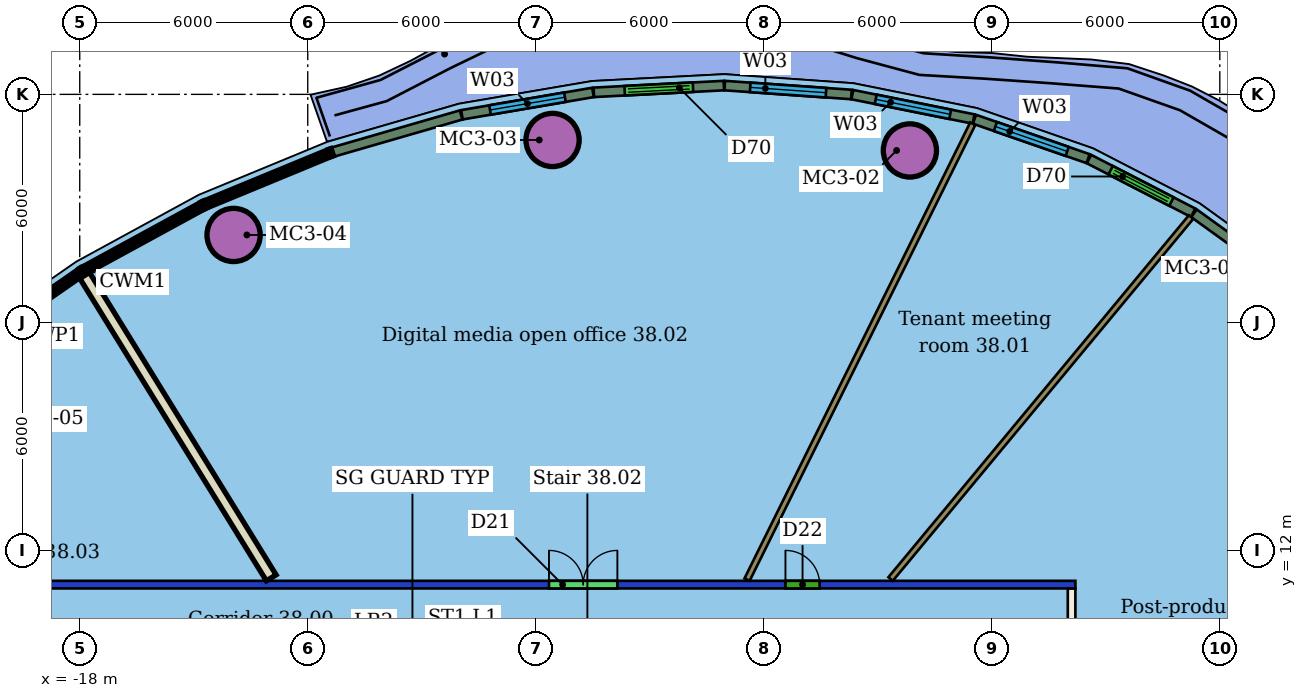
"""IFC4 building model, lengths in metres.
Left out: names, types, materials, properties, quantities, classifications, styles, units other than length and angle.
Written with IfcOpenShell. Run it as: python <this file> out.ifc"""

import sys

from ifc_helpers import new_model, si_unit, direction, frame, frame_2d, origin, origin_2d, place, context, subcontext, project, spatial, rectangle, hollow_circle, extrude, element, fill, save


model = new_model("IFC4")
c1 = context("Model", 3, precision=1e-05, world=origin(), true_north=direction((0.0, 1.0)))
c2 = subcontext(c1, "Body", "Model", "MODEL_VIEW")
j1 = project(units=[si_unit("LENGTHUNIT", "METRE"), si_unit("PLANEANGLEUNIT", "RADIAN")], contexts=[c1])
p1 = place(None, origin())
s1 = spatial("IfcSite", under=j1, at=p1, CompositionType="ELEMENT")
p2 = place(p1, origin())
s2 = spatial("IfcBuilding", under=s1, at=p2, CompositionType="ELEMENT")
p3 = place(p2, frame((0.0, 0.0, 161.4)))
s3 = spatial("IfcBuildingStorey", under=s2, at=p3, CompositionType="ELEMENT", Elevation=161.4)
for number, where, z_axis, x_axis in (
    (1, (3.845, 22.524, 0.0), (0.0, 0.0, 1.0), (1.0, 0.0, 0.0)),
    (2, (-5.558, 22.8, 0.0), (0.0, 0.0, 1.0), (1.0, 0.0, 0.0)),
    (3, (-13.952, 20.301, 0.0), (0.0, 0.0, 1.0), (1.0, 0.0, 0.0)),
):
    element("IfcColumn", number, at=place(p3, frame(where, z_axis=z_axis, x_axis=x_axis)), inside=s3, PredefinedType="COLUMN", context=c2, shape_type="SweptSolid", body=[
        extrude(hollow_circle(Radius=0.7, WallThickness=0.05, at=origin_2d()), origin(), (0.0, 0.0, 1.0), 3.45),
    ])
p4 = place(p3, frame((-20.2, 11.1, 0.0), z_axis=(0.0, 0.0, 1.0), x_axis=(1.0, 0.0, 0.0)))
e4 = element("IfcWall", 4, at=p4, inside=s3, PredefinedType="PARTITIONING", context=c2, shape_type="SweptSolid", body=[
    extrude(rectangle(XDim=28.4, YDim=0.2, at=frame_2d((14.2, 0.0))), origin(), (0.0, 0.0, 1.0), 3.05),
])
p5 = place(p4, frame((20.771, 0.0, 0.0)))
e5 = element("IfcOpeningElement", 5, at=p5, cuts=e4, PredefinedType="OPENING", context=c2, shape_type="SweptSolid", body=[
    extrude(rectangle(XDim=0.9, YDim=2.1, at=frame_2d((0.45, 1.05))), frame((0.0, 0.11, 0.0), z_axis=(0.0, -1.0, 0.0), x_axis=(1.0, 0.0, 0.0)), (0.0, 0.0, 1.0), 0.22),
])
p6 = place(p4, frame((14.548, 0.0, 0.0)))
e6 = element("IfcOpeningElement", 6, at=p6, cuts=e4, PredefinedType="OPENING", context=c2, shape_type="SweptSolid", body=[
    extrude(rectangle(XDim=1.8, YDim=2.1, at=frame_2d((0.9, 1.05))), frame((0.0, 0.11, 0.0), z_axis=(0.0, -1.0, 0.0), x_axis=(1.0, 0.0, 0.0)), (0.0, 0.0, 1.0), 0.22),
])
p7 = place(p3, frame((8.1, 11.0, 0.0), z_axis=(0.0, 0.0, 1.0), x_axis=(0.0, -1.0, 0.0)))
e7 = element("IfcWall", 7, at=p7, inside=s3, PredefinedType="PARTITIONING", context=c2, shape_type="SweptSolid", body=[
    extrude(rectangle(XDim=22.0, YDim=0.2, at=frame_2d((11.0, 0.0))), origin(), (0.0, 0.0, 1.0), 3.45),
])
p8 = place(p7, frame((12.884, 0.0, 0.0)))
e8 = element("IfcOpeningElement", 8, at=p8, cuts=e7, PredefinedType="OPENING", context=c2, shape_type="SweptSolid", body=[
    extrude(rectangle(XDim=1.8, YDim=2.1, at=frame_2d((0.9, 1.05))), frame((0.0, 0.11, 0.0), z_axis=(0.0, -1.0, 0.0), x_axis=(1.0, 0.0, 0.0)), (0.0, 0.0, 1.0), 0.22),
])
p9 = place(p7, frame((5.074, 0.0, 0.0)))
e9 = element("IfcOpeningElement", 9, at=p9, cuts=e7, PredefinedType="OPENING", context=c2, shape_type="SweptSolid", body=[
    extrude(rectangle(XDim=1.8, YDim=2.1, at=frame_2d((0.9, 1.05))), frame((0.0, 0.11, 0.0), z_axis=(0.0, -1.0, 0.0), x_axis=(1.0, 0.0, 0.0)), (0.0, 0.0, 1.0), 0.22),
])
p10 = place(p3, frame((11.244, 20.772, 0.0), z_axis=(0.0, 0.0, 1.0), x_axis=(-0.638730261961, -0.769430732721, 0.0)))
e10 = element("IfcWall", 10, at=p10, inside=s3, PredefinedType="PARTITIONING", context=c2, shape_type="SweptSolid", body=[
    extrude(rectangle(XDim=12.379, YDim=0.15, at=frame_2d((6.189, 0.0))), origin(), (0.0, 0.0, 1.0), 3.45),
])
p11 = place(p3, frame((5.499, 23.229, 0.0), z_axis=(0.0, 0.0, 1.0), x_axis=(-0.443656871775, -0.896196730705, 0.0)))
e11 = element("IfcWall", 11, at=p11, inside=s3, PredefinedType="PARTITIONING", context=c2, shape_type="SweptSolid", body=[
    extrude(rectangle(XDim=13.385, YDim=0.15, at=frame_2d((6.692, 0.0))), origin(), (0.0, 0.0, 1.0), 3.45),
])
p12 = place(p3, frame((-17.871, 19.235, 0.0), z_axis=(0.0, 0.0, 1.0), x_axis=(0.525169292987, -0.850997775381, 0.0)))
e12 = element("IfcWall", 12, at=p12, inside=s3, PredefinedType="PARTITIONING", context=c2, shape_type="SweptSolid", body=[
    extrude(rectangle(XDim=9.35, YDim=0.3, at=frame_2d((4.675, 0.0))), origin(), (0.0, 0.0, 1.0), 3.45),
])
p13 = place(p3, frame((13.732, 19.131, 0.0), z_axis=(0.0, 0.0, 1.0), x_axis=(-0.810861050922, 0.58523871719, 0.0)))
e13 = element("IfcWall", 13, at=p13, inside=s3, PredefinedType="SOLIDWALL", context=c2, shape_type="SweptSolid", body=[
    extrude(rectangle(XDim=2.974, YDim=0.25, at=frame_2d((1.487, 0.0))), origin(), (0.0, 0.0, 1.0), 3.1),
])
p14 = place(p3, frame((11.298, 20.885, 0.0), z_axis=(0.0, 0.0, 1.0), x_axis=(-0.88878300735, 0.458328229378, 0.0)))
e14 = element("IfcWall", 14, at=p14, inside=s3, PredefinedType="SOLIDWALL", context=c2, shape_type="SweptSolid", body=[
    extrude(rectangle(XDim=3.083, YDim=0.25, at=frame_2d((1.542, 0.0))), origin(), (0.0, 0.0, 1.0), 3.1),
])
p15 = place(p14, frame((0.642, 0.0, 0.0)))
e15 = element("IfcOpeningElement", 15, at=p15, cuts=e14, PredefinedType="OPENING", context=c2, shape_type="SweptSolid", body=[
    extrude(rectangle(XDim=1.8, YDim=2.4, at=frame_2d((0.9, 1.2))), frame((0.0, 0.135, 0.0), z_axis=(0.0, -1.0, 0.0), x_axis=(1.0, 0.0, 0.0)), (0.0, 0.0, 1.0), 0.27),
])
p16 = place(p3, frame((8.534, 22.308, 0.0), z_axis=(0.0, 0.0, 1.0), x_axis=(-0.944803405923, 0.32763779415, 0.0)))
e16 = element("IfcWall", 16, at=p16, inside=s3, PredefinedType="SOLIDWALL", context=c2, shape_type="SweptSolid", body=[
    extrude(rectangle(XDim=3.165, YDim=0.25, at=frame_2d((1.582, 0.0))), origin(), (0.0, 0.0, 1.0), 3.1),
])
p17 = place(p16, frame((0.582, 0.0, 0.9)))
e17 = element("IfcOpeningElement", 17, at=p17, cuts=e16, PredefinedType="OPENING", context=c2, shape_type="SweptSolid", body=[
    extrude(rectangle(XDim=2.0, YDim=2.1, at=frame_2d((1.0, 1.05))), frame((0.0, 0.135, 0.0), z_axis=(0.0, -1.0, 0.0), x_axis=(1.0, 0.0, 0.0)), (0.0, 0.0, 1.0), 0.27),
])
p18 = place(p3, frame((5.52, 23.352, 0.0), z_axis=(0.0, 0.0, 1.0), x_axis=(-0.98035778713, 0.19722730342, 0.0)))
e18 = element("IfcWall", 18, at=p18, inside=s3, PredefinedType="SOLIDWALL", context=c2, shape_type="SweptSolid", body=[
    extrude(rectangle(XDim=3.253, YDim=0.25, at=frame_2d((1.626, 0.0))), origin(), (0.0, 0.0, 1.0), 3.1),
])
p19 = place(p18, frame((0.626, 0.0, 0.9)))
e19 = element("IfcOpeningElement", 19, at=p19, cuts=e18, PredefinedType="OPENING", context=c2, shape_type="SweptSolid", body=[
    extrude(rectangle(XDim=2.0, YDim=2.1, at=frame_2d((1.0, 1.05))), frame((0.0, 0.135, 0.0), z_axis=(0.0, -1.0, 0.0), x_axis=(1.0, 0.0, 0.0)), (0.0, 0.0, 1.0), 0.27),
])
p20 = place(p3, frame((2.307, 23.997, 0.0), z_axis=(0.0, 0.0, 1.0), x_axis=(-0.997538162384, 0.070125705616, 0.0)))
e20 = element("IfcWall", 20, at=p20, inside=s3, PredefinedType="SOLIDWALL", context=c2, shape_type="SweptSolid", body=[
    extrude(rectangle(XDim=3.342, YDim=0.25, at=frame_2d((1.671, 0.0))), origin(), (0.0, 0.0, 1.0), 3.1),
])
p21 = place(p20, frame((0.671, 0.0, 0.9)))
e21 = element("IfcOpeningElement", 21, at=p21, cuts=e20, PredefinedType="OPENING", context=c2, shape_type="SweptSolid", body=[
    extrude(rectangle(XDim=2.0, YDim=2.1, at=frame_2d((1.0, 1.05))), frame((0.0, 0.135, 0.0), z_axis=(0.0, -1.0, 0.0), x_axis=(1.0, 0.0, 0.0)), (0.0, 0.0, 1.0), 0.27),
])
p22 = place(p3, frame((-1.05, 24.231, 0.0), z_axis=(0.0, 0.0, 1.0), x_axis=(-0.99864973031, -0.051949168931, 0.0)))
e22 = element("IfcWall", 22, at=p22, inside=s3, PredefinedType="SOLIDWALL", context=c2, shape_type="SweptSolid", body=[
    extrude(rectangle(XDim=3.426, YDim=0.25, at=frame_2d((1.713, 0.0))), origin(), (0.0, 0.0, 1.0), 3.1),
])
p23 = place(p22, frame((0.813, 0.0, 0.0)))
e23 = element("IfcOpeningElement", 23, at=p23, cuts=e22, PredefinedType="OPENING", context=c2, shape_type="SweptSolid", body=[
    extrude(rectangle(XDim=1.8, YDim=2.4, at=frame_2d((0.9, 1.2))), frame((0.0, 0.135, 0.0), z_axis=(0.0, -1.0, 0.0), x_axis=(1.0, 0.0, 0.0)), (0.0, 0.0, 1.0), 0.27),
])
p24 = place(p3, frame((-4.494, 24.051, 0.0), z_axis=(0.0, 0.0, 1.0), x_axis=(-0.985772258291, -0.168086450327, 0.0)))
e24 = element("IfcWall", 24, at=p24, inside=s3, PredefinedType="SOLIDWALL", context=c2, shape_type="SweptSolid", body=[
    extrude(rectangle(XDim=3.499, YDim=0.25, at=frame_2d((1.75, 0.0))), origin(), (0.0, 0.0, 1.0), 3.1),
])
p25 = place(p24, frame((0.75, 0.0, 0.9)))
e25 = element("IfcOpeningElement", 25, at=p25, cuts=e24, PredefinedType="OPENING", context=c2, shape_type="SweptSolid", body=[
    extrude(rectangle(XDim=2.0, YDim=2.1, at=frame_2d((1.0, 1.05))), frame((0.0, 0.135, 0.0), z_axis=(0.0, -1.0, 0.0), x_axis=(1.0, 0.0, 0.0)), (0.0, 0.0, 1.0), 0.27),
])
p26 = place(p3, frame((-7.965, 23.458, 0.0), z_axis=(0.0, 0.0, 1.0), x_axis=(-0.960600884438, -0.277931539801, 0.0)))
e26 = element("IfcWall", 26, at=p26, inside=s3, PredefinedType="SOLIDWALL", context=c2, shape_type="SweptSolid", body=[
    extrude(rectangle(XDim=3.514, YDim=0.25, at=frame_2d((1.757, 0.0))), origin(), (0.0, 0.0, 1.0), 3.1),
])
p27 = place(p5, origin())
e27 = element("IfcDoor", 27, at=p27, inside=s3, OperationType="SINGLE_SWING_LEFT", PredefinedType="DOOR", context=c2, shape_type="SweptSolid", body=[
    extrude(rectangle(XDim=0.9, YDim=2.1, at=frame_2d((0.45, 1.05))), frame((0.0, 0.025, 0.0), z_axis=(0.0, -1.0, 0.0), x_axis=(1.0, 0.0, 0.0)), (0.0, 0.0, 1.0), 0.05),
])
fill(e5, e27)
p28 = place(p6, origin())
e28 = element("IfcDoor", 28, at=p28, inside=s3, OperationType="DOUBLE_DOOR_SINGLE_SWING", PredefinedType="DOOR", context=c2, shape_type="SweptSolid", body=[
    extrude(rectangle(XDim=1.8, YDim=2.1, at=frame_2d((0.9, 1.05))), frame((0.0, 0.025, 0.0), z_axis=(0.0, -1.0, 0.0), x_axis=(1.0, 0.0, 0.0)), (0.0, 0.0, 1.0), 0.05),
])
fill(e6, e28)
p29 = place(p15, origin())
e29 = element("IfcDoor", 29, at=p29, inside=s3, OperationType="DOUBLE_DOOR_SLIDING", PredefinedType="DOOR", context=c2, shape_type="SweptSolid", body=[
    extrude(rectangle(XDim=1.8, YDim=2.4, at=frame_2d((0.9, 1.2))), frame((0.0, 0.025, 0.0), z_axis=(0.0, -1.0, 0.0), x_axis=(1.0, 0.0, 0.0)), (0.0, 0.0, 1.0), 0.05),
])
fill(e15, e29)
p30 = place(p17, origin())
e30 = element("IfcWindow", 30, at=p30, inside=s3, PartitioningType="SINGLE_PANEL", PredefinedType="WINDOW", context=c2, shape_type="SweptSolid", body=[
    extrude(rectangle(XDim=2.0, YDim=2.1, at=frame_2d((1.0, 1.05))), frame((0.0, 0.03, 0.0), z_axis=(0.0, -1.0, 0.0), x_axis=(1.0, 0.0, 0.0)), (0.0, 0.0, 1.0), 0.06),
])
fill(e17, e30)
p31 = place(p19, origin())
e31 = element("IfcWindow", 31, at=p31, inside=s3, PartitioningType="SINGLE_PANEL", PredefinedType="WINDOW", context=c2, shape_type="SweptSolid", body=[
    extrude(rectangle(XDim=2.0, YDim=2.1, at=frame_2d((1.0, 1.05))), frame((0.0, 0.03, 0.0), z_axis=(0.0, -1.0, 0.0), x_axis=(1.0, 0.0, 0.0)), (0.0, 0.0, 1.0), 0.06),
])
fill(e19, e31)
p32 = place(p21, origin())
e32 = element("IfcWindow", 32, at=p32, inside=s3, PartitioningType="SINGLE_PANEL", PredefinedType="WINDOW", context=c2, shape_type="SweptSolid", body=[
    extrude(rectangle(XDim=2.0, YDim=2.1, at=frame_2d((1.0, 1.05))), frame((0.0, 0.03, 0.0), z_axis=(0.0, -1.0, 0.0), x_axis=(1.0, 0.0, 0.0)), (0.0, 0.0, 1.0), 0.06),
])
fill(e21, e32)
p33 = place(p23, origin())
e33 = element("IfcDoor", 33, at=p33, inside=s3, OperationType="DOUBLE_DOOR_SLIDING", PredefinedType="DOOR", context=c2, shape_type="SweptSolid", body=[
    extrude(rectangle(XDim=1.8, YDim=2.4, at=frame_2d((0.9, 1.2))), frame((0.0, 0.025, 0.0), z_axis=(0.0, -1.0, 0.0), x_axis=(1.0, 0.0, 0.0)), (0.0, 0.0, 1.0), 0.05),
])
fill(e23, e33)
p34 = place(p25, origin())
e34 = element("IfcWindow", 34, at=p34, inside=s3, PartitioningType="SINGLE_PANEL", PredefinedType="WINDOW", context=c2, shape_type="SweptSolid", body=[
    extrude(rectangle(XDim=2.0, YDim=2.1, at=frame_2d((1.0, 1.05))), frame((0.0, 0.03, 0.0), z_axis=(0.0, -1.0, 0.0), x_axis=(1.0, 0.0, 0.0)), (0.0, 0.0, 1.0), 0.06),
])
fill(e25, e34)
save(model, sys.argv[1])
